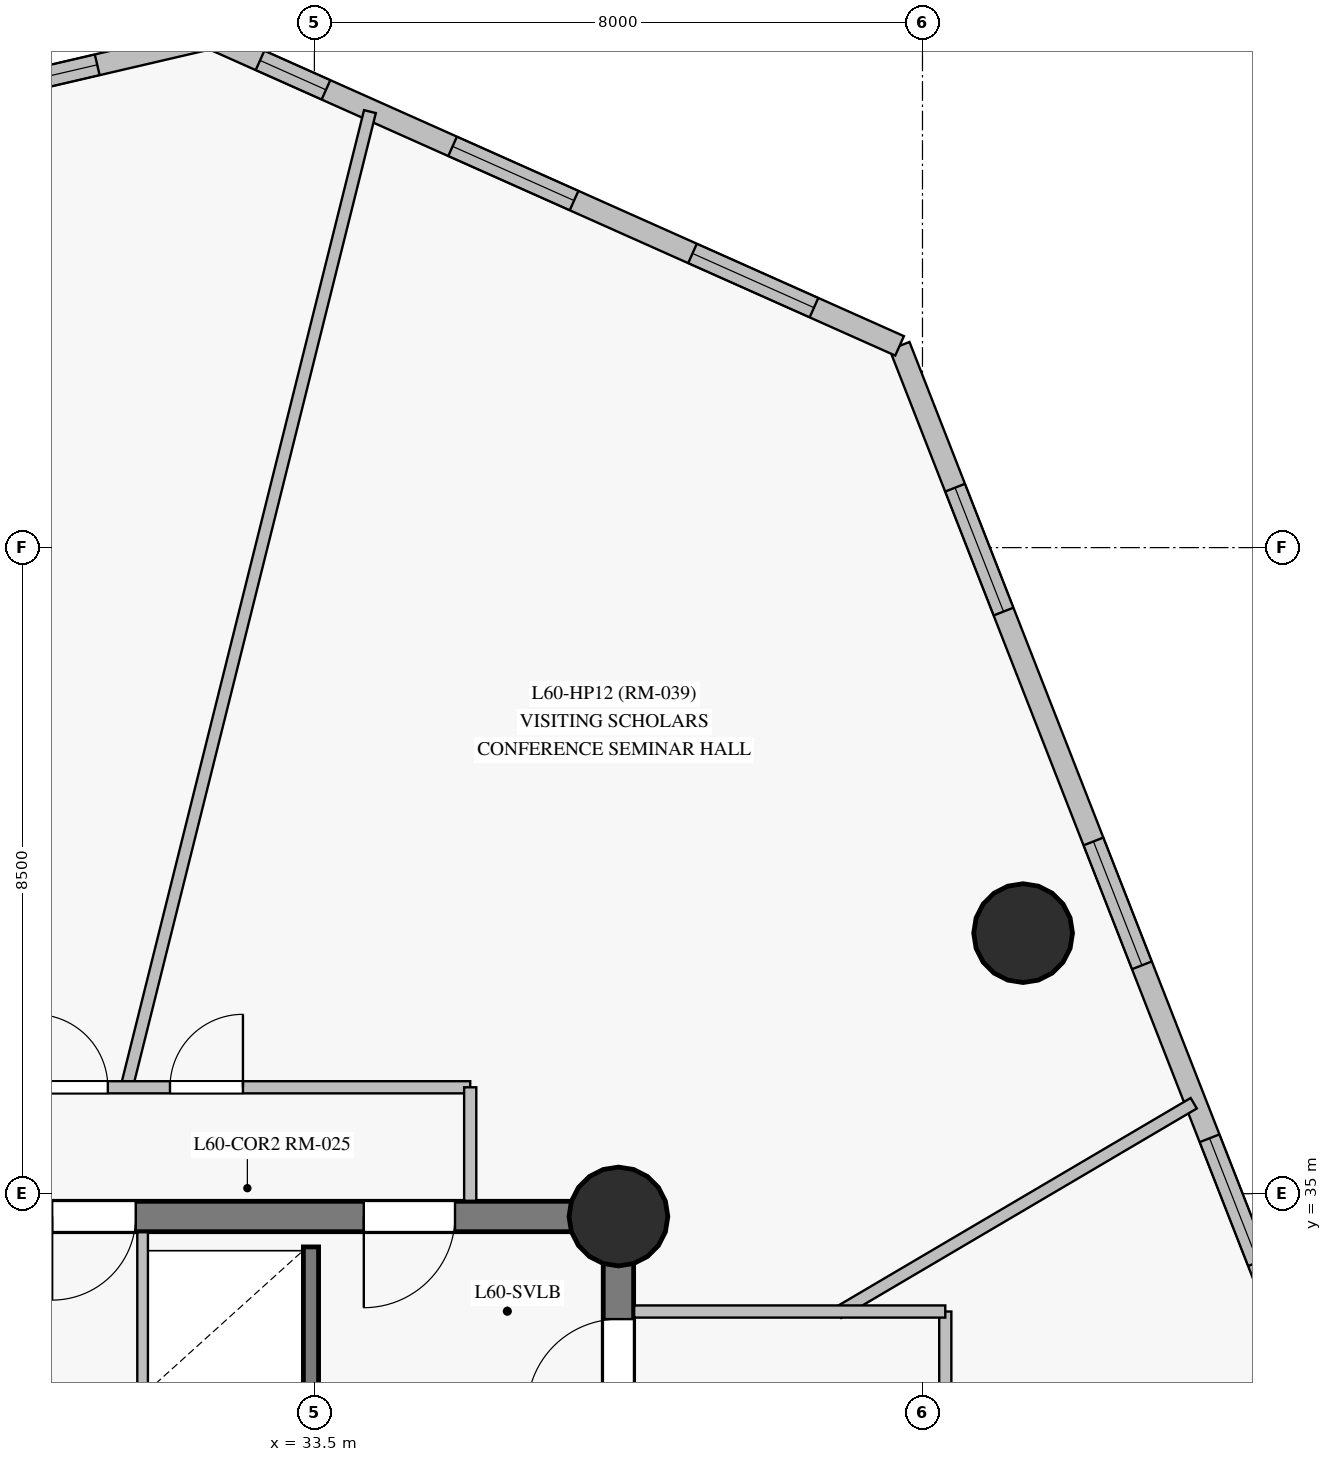
"""IFC4 building model, lengths in metres.
Left out: names, types, materials, properties, quantities, classifications, styles, units other than length and angle.
Written with IfcOpenShell. Run it as: python <this file> out.ifc"""

import sys

from ifc_helpers import new_model, si_unit, direction, frame, frame_2d, origin, origin_with_axes, origin_2d, place, context, subcontext, project, spatial, rectangle, circle, extrude, source, transform, mapped, element, fill, save


model = new_model("IFC4")
c1 = context("Model", 3, precision=1e-05, world=origin(), true_north=direction((0.0, 1.0)))
c2 = subcontext(c1, "Body", "Model", "MODEL_VIEW")
j1 = project(units=[si_unit("LENGTHUNIT", "METRE"), si_unit("PLANEANGLEUNIT", "RADIAN")], contexts=[c1])
p1 = place(None, origin())
s1 = spatial("IfcSite", under=j1, at=p1, CompositionType="ELEMENT")
p2 = place(p1, origin())
s2 = spatial("IfcBuilding", under=s1, at=p2, CompositionType="ELEMENT")
p3 = place(p2, frame((0.0, 0.0, 205.35)))
s3 = spatial("IfcBuildingStorey", under=s2, at=p3, CompositionType="ELEMENT", Elevation=205.35)
p4 = place(p3, frame((37.5, 18.3, 0.0), z_axis=(0.0, 0.0, 1.0), x_axis=(0.0, 1.0, 0.0)))
e1 = element("IfcWall", 1, at=p4, inside=s3, PredefinedType="SHEAR", context=c2, shape_type="SweptSolid", body=[
    extrude(rectangle(XDim=16.4, YDim=0.4, at=frame_2d((8.2, 0.0))), origin(), (0.0, 0.0, 1.0), 2.775),
])
p5 = place(p4, frame((13.85, 0.0, 0.0)))
e2 = element("IfcOpeningElement", 2, at=p5, cuts=e1, PredefinedType="OPENING", context=c2, shape_type="SweptSolid", body=[
    extrude(rectangle(XDim=1.2, YDim=2.15, at=frame_2d((0.6, 1.075))), frame((0.0, 0.21, 0.0), z_axis=(0.0, -1.0, 0.0), x_axis=(1.0, 0.0, 0.0)), (0.0, 0.0, 1.0), 0.42),
])
p6 = place(p3, frame((37.5, 34.7, 0.0), z_axis=(0.0, 0.0, 1.0), x_axis=(-1.0, 0.0, 0.0)))
e3 = element("IfcWall", 3, at=p6, inside=s3, PredefinedType="SHEAR", context=c2, shape_type="SweptSolid", body=[
    extrude(rectangle(XDim=10.95, YDim=0.4, at=frame_2d((5.475, 0.0))), origin(), (0.0, 0.0, 1.0), 2.775),
])
p7 = place(p6, frame((2.15, 0.0, 0.0)))
e4 = element("IfcOpeningElement", 4, at=p7, cuts=e3, PredefinedType="OPENING", context=c2, shape_type="SweptSolid", body=[
    extrude(rectangle(XDim=1.2, YDim=2.15, at=frame_2d((0.6, 1.075))), frame((0.0, 0.21, 0.0), z_axis=(0.0, -1.0, 0.0), x_axis=(1.0, 0.0, 0.0)), (0.0, 0.0, 1.0), 0.42),
])
p8 = place(p6, frame((6.35, 0.0, 0.0)))
e5 = element("IfcOpeningElement", 5, at=p8, cuts=e3, PredefinedType="OPENING", context=c2, shape_type="SweptSolid", body=[
    extrude(rectangle(XDim=1.1, YDim=2.15, at=frame_2d((0.55, 1.075))), frame((0.0, 0.21, 0.0), z_axis=(0.0, -1.0, 0.0), x_axis=(1.0, 0.0, 0.0)), (0.0, 0.0, 1.0), 0.42),
])
m1 = source(origin_with_axes(), c2, "Body", "SweptSolid", [
    extrude(circle(Radius=0.65, at=origin_2d()), origin(), (0.0, 0.0, 1.0), 3.05),
])
for number, where, z_axis, x_axis in (
    (6, (37.5, 34.7, 0.0), (0.0, 0.0, 1.0), (1.0, 0.0, 0.0)),
    (7, (42.824, 38.428, 0.0), (0.0, 0.0, 1.0), (1.0, 0.0, 0.0)),
):
    element("IfcColumn", number, at=place(p3, frame(where, z_axis=z_axis, x_axis=x_axis)), inside=s3, PredefinedType="COLUMN", context=c2, shape_type="MappedRepresentation", body=[
        mapped(m1, transform((0.0, 0.0, 0.0), scale=1.0)),
    ])
p9 = place(p3, frame((46.118, 33.578, 0.0), z_axis=(0.0, 0.0, 1.0), x_axis=(-0.364297776346, 0.931282518976, 0.0)))
e8 = element("IfcWall", 8, at=p9, inside=s3, PredefinedType="SOLIDWALL", context=c2, shape_type="SweptSolid", body=[
    extrude(rectangle(XDim=13.504, YDim=0.28, at=frame_2d((6.752, 0.0))), origin(), (0.0, 0.0, 1.0), 2.775),
])
p10 = place(p9, frame((0.56, 0.0, 0.85)))
e9 = element("IfcOpeningElement", 9, at=p10, cuts=e8, PredefinedType="OPENING", context=c2, shape_type="SweptSolid", body=[
    extrude(rectangle(XDim=1.75, YDim=1.65, at=frame_2d((0.875, 0.825))), frame((0.0, 0.15, 0.0), z_axis=(0.0, -1.0, 0.0), x_axis=(1.0, 0.0, 0.0)), (0.0, 0.0, 1.0), 0.3),
])
p11 = place(p9, frame((4.753, 0.0, 0.85)))
e10 = element("IfcOpeningElement", 10, at=p11, cuts=e8, PredefinedType="OPENING", context=c2, shape_type="SweptSolid", body=[
    extrude(rectangle(XDim=1.75, YDim=1.65, at=frame_2d((0.875, 0.825))), frame((0.0, 0.15, 0.0), z_axis=(0.0, -1.0, 0.0), x_axis=(1.0, 0.0, 0.0)), (0.0, 0.0, 1.0), 0.3),
])
p12 = place(p9, frame((9.75, 0.0, 0.85)))
e11 = element("IfcOpeningElement", 11, at=p12, cuts=e8, PredefinedType="OPENING", context=c2, shape_type="SweptSolid", body=[
    extrude(rectangle(XDim=1.75, YDim=1.65, at=frame_2d((0.875, 0.825))), frame((0.0, 0.15, 0.0), z_axis=(0.0, -1.0, 0.0), x_axis=(1.0, 0.0, 0.0)), (0.0, 0.0, 1.0), 0.3),
])
p13 = place(p3, frame((41.199, 46.154, 0.0), z_axis=(0.0, 0.0, 1.0), x_axis=(-0.913173362766, 0.407571355144, 0.0)))
e12 = element("IfcWall", 12, at=p13, inside=s3, PredefinedType="SOLIDWALL", context=c2, shape_type="SweptSolid", body=[
    extrude(rectangle(XDim=9.925, YDim=0.28, at=frame_2d((4.962, 0.0))), origin(), (0.0, 0.0, 1.0), 2.775),
])
p14 = place(p13, frame((1.233, 0.0, 0.85)))
e13 = element("IfcOpeningElement", 13, at=p14, cuts=e12, PredefinedType="OPENING", context=c2, shape_type="SweptSolid", body=[
    extrude(rectangle(XDim=1.75, YDim=1.65, at=frame_2d((0.875, 0.825))), frame((0.0, 0.15, 0.0), z_axis=(0.0, -1.0, 0.0), x_axis=(1.0, 0.0, 0.0)), (0.0, 0.0, 1.0), 0.3),
])
p15 = place(p13, frame((4.69, 0.0, 0.85)))
e14 = element("IfcOpeningElement", 14, at=p15, cuts=e12, PredefinedType="OPENING", context=c2, shape_type="SweptSolid", body=[
    extrude(rectangle(XDim=1.75, YDim=1.65, at=frame_2d((0.875, 0.825))), frame((0.0, 0.15, 0.0), z_axis=(0.0, -1.0, 0.0), x_axis=(1.0, 0.0, 0.0)), (0.0, 0.0, 1.0), 0.3),
])
p16 = place(p13, frame((8.264, 0.0, 0.85)))
e15 = element("IfcOpeningElement", 15, at=p16, cuts=e12, PredefinedType="OPENING", context=c2, shape_type="SweptSolid", body=[
    extrude(rectangle(XDim=0.95, YDim=1.5, at=frame_2d((0.475, 0.75))), frame((0.0, 0.15, 0.0), z_axis=(0.0, -1.0, 0.0), x_axis=(1.0, 0.0, 0.0)), (0.0, 0.0, 1.0), 0.3),
])
p17 = place(p3, frame((32.136, 50.199, 0.0), z_axis=(0.0, 0.0, 1.0), x_axis=(-0.973978370764, -0.226640978826, 0.0)))
e16 = element("IfcWall", 16, at=p17, inside=s3, PredefinedType="SOLIDWALL", context=c2, shape_type="SweptSolid", body=[
    extrude(rectangle(XDim=12.929, YDim=0.28, at=frame_2d((6.464, 0.0))), origin(), (0.0, 0.0, 1.0), 2.775),
])
p18 = place(p17, frame((1.533, 0.0, 0.85)))
e17 = element("IfcOpeningElement", 17, at=p18, cuts=e16, PredefinedType="OPENING", context=c2, shape_type="SweptSolid", body=[
    extrude(rectangle(XDim=1.75, YDim=1.65, at=frame_2d((0.875, 0.825))), frame((0.0, 0.15, 0.0), z_axis=(0.0, -1.0, 0.0), x_axis=(1.0, 0.0, 0.0)), (0.0, 0.0, 1.0), 0.3),
])
p19 = place(p17, frame((5.59, 0.0, 0.85)))
e18 = element("IfcOpeningElement", 18, at=p19, cuts=e16, PredefinedType="OPENING", context=c2, shape_type="SweptSolid", body=[
    extrude(rectangle(XDim=1.75, YDim=1.65, at=frame_2d((0.875, 0.825))), frame((0.0, 0.15, 0.0), z_axis=(0.0, -1.0, 0.0), x_axis=(1.0, 0.0, 0.0)), (0.0, 0.0, 1.0), 0.3),
])
p20 = place(p17, frame((9.646, 0.0, 0.85)))
e19 = element("IfcOpeningElement", 19, at=p20, cuts=e16, PredefinedType="OPENING", context=c2, shape_type="SweptSolid", body=[
    extrude(rectangle(XDim=1.75, YDim=1.65, at=frame_2d((0.875, 0.825))), frame((0.0, 0.15, 0.0), z_axis=(0.0, -1.0, 0.0), x_axis=(1.0, 0.0, 0.0)), (0.0, 0.0, 1.0), 0.3),
])
p21 = place(p3, frame((33.455, 18.7, 0.0), z_axis=(0.0, 0.0, 1.0), x_axis=(0.0, 1.0, 0.0)))
e20 = element("IfcWall", 20, at=p21, inside=s3, PredefinedType="SHEAR", context=c2, shape_type="SweptSolid", body=[
    extrude(rectangle(XDim=15.6, YDim=0.2, at=frame_2d((7.8, 0.0))), origin(), (0.0, 0.0, 1.0), 2.775),
])
p22 = place(p21, frame((2.75, 0.0, 0.0)))
e21 = element("IfcOpeningElement", 21, at=p22, cuts=e20, PredefinedType="OPENING", context=c2, shape_type="SweptSolid", body=[
    extrude(rectangle(XDim=1.15, YDim=2.15, at=frame_2d((0.575, 1.075))), frame((0.0, 0.11, 0.0), z_axis=(0.0, -1.0, 0.0), x_axis=(1.0, 0.0, 0.0)), (0.0, 0.0, 1.0), 0.22),
])
p23 = place(p21, frame((0.55, 0.0, 0.0)))
e22 = element("IfcOpeningElement", 22, at=p23, cuts=e20, PredefinedType="OPENING", context=c2, shape_type="SweptSolid", body=[
    extrude(rectangle(XDim=0.94, YDim=2.1, at=frame_2d((0.47, 1.05))), frame((0.0, 0.11, 0.0), z_axis=(0.0, -1.0, 0.0), x_axis=(1.0, 0.0, 0.0)), (0.0, 0.0, 1.0), 0.22),
])
p24 = place(p3, frame((41.8, 33.45, 0.0), z_axis=(0.0, 0.0, 1.0), x_axis=(0.0, -1.0, 0.0)))
e23 = element("IfcWall", 23, at=p24, inside=s3, PredefinedType="PARTITIONING", context=c2, shape_type="SweptSolid", body=[
    extrude(rectangle(XDim=19.6, YDim=0.16, at=frame_2d((9.8, 0.0))), origin(), (0.0, 0.0, 1.0), 2.225),
])
p25 = place(p24, frame((9.325, 0.0, 0.0)))
e24 = element("IfcOpeningElement", 24, at=p25, cuts=e23, PredefinedType="OPENING", context=c2, shape_type="SweptSolid", body=[
    extrude(rectangle(XDim=0.96, YDim=2.15, at=frame_2d((0.48, 1.075))), frame((0.0, 0.09, 0.0), z_axis=(0.0, -1.0, 0.0), x_axis=(1.0, 0.0, 0.0)), (0.0, 0.0, 1.0), 0.18),
])
p26 = place(p24, frame((4.425, 0.0, 0.0)))
e25 = element("IfcOpeningElement", 25, at=p26, cuts=e23, PredefinedType="OPENING", context=c2, shape_type="SweptSolid", body=[
    extrude(rectangle(XDim=0.96, YDim=2.15, at=frame_2d((0.48, 1.075))), frame((0.0, 0.09, 0.0), z_axis=(0.0, -1.0, 0.0), x_axis=(1.0, 0.0, 0.0)), (0.0, 0.0, 1.0), 0.18),
])
p27 = place(p3, frame((31.023, 36.371, 0.0), z_axis=(0.0, 0.0, 1.0), x_axis=(0.241933352584, 0.970292869657, 0.0)))
e26 = element("IfcWall", 26, at=p27, inside=s3, PredefinedType="PARTITIONING", context=c2, shape_type="SweptSolid", body=[
    extrude(rectangle(XDim=13.259, YDim=0.16, at=frame_2d((6.629, 0.0))), origin(), (0.0, 0.0, 1.0), 2.775),
])
p28 = place(p3, frame((28.6, 36.4, 0.0), z_axis=(0.0, 0.0, 1.0), x_axis=(1.0, 0.0, 0.0)))
e27 = element("IfcWall", 27, at=p28, inside=s3, PredefinedType="PARTITIONING", context=c2, shape_type="SweptSolid", body=[
    extrude(rectangle(XDim=6.95, YDim=0.16, at=frame_2d((3.475, 0.0))), origin(), (0.0, 0.0, 1.0), 2.325),
])
p29 = place(p28, frame((3.0, 0.0, 0.0)))
e28 = element("IfcOpeningElement", 28, at=p29, cuts=e27, PredefinedType="OPENING", context=c2, shape_type="SweptSolid", body=[
    extrude(rectangle(XDim=0.96, YDim=2.15, at=frame_2d((0.48, 1.075))), frame((0.0, 0.09, 0.0), z_axis=(0.0, -1.0, 0.0), x_axis=(1.0, 0.0, 0.0)), (0.0, 0.0, 1.0), 0.18),
])
p30 = place(p28, frame((1.222, 0.0, 0.0)))
e29 = element("IfcOpeningElement", 29, at=p30, cuts=e27, PredefinedType="OPENING", context=c2, shape_type="SweptSolid", body=[
    extrude(rectangle(XDim=0.96, YDim=2.15, at=frame_2d((0.48, 1.075))), frame((0.0, 0.09, 0.0), z_axis=(0.0, -1.0, 0.0), x_axis=(1.0, 0.0, 0.0)), (0.0, 0.0, 1.0), 0.18),
])
p31 = place(p3, frame((40.391, 33.435, 0.0), z_axis=(0.0, 0.0, 1.0), x_axis=(0.861631176483, 0.507534940386, 0.0)))
e30 = element("IfcWall", 30, at=p31, inside=s3, PredefinedType="PARTITIONING", context=c2, shape_type="SweptSolid", body=[
    extrude(rectangle(XDim=5.429, YDim=0.16, at=frame_2d((2.714, 0.0))), origin(), (0.0, 0.0, 1.0), 2.775),
])
p32 = place(p3, frame((37.707, 33.45, 0.0), z_axis=(0.0, 0.0, 1.0), x_axis=(1.0, 0.0, 0.0)))
e31 = element("IfcWall", 31, at=p32, inside=s3, PredefinedType="PARTITIONING", context=c2, shape_type="SweptSolid", body=[
    extrude(rectangle(XDim=4.093, YDim=0.16, at=frame_2d((2.046, 0.0))), origin(), (0.0, 0.0, 1.0), 2.775),
])
p33 = place(p3, frame((31.24, 30.45, 0.0), z_axis=(0.0, 0.0, 1.0), x_axis=(0.0, 1.0, 0.0)))
e32 = element("IfcWall", 32, at=p33, inside=s3, PredefinedType="PARTITIONING", context=c2, shape_type="SweptSolid", body=[
    extrude(rectangle(XDim=4.043, YDim=0.14, at=frame_2d((2.021, 0.0))), origin(), (0.0, 0.0, 1.0), 2.775),
])
p34 = place(p3, frame((35.55, 36.4, 0.0), z_axis=(0.0, 0.0, 1.0), x_axis=(0.0, -1.0, 0.0)))
e33 = element("IfcWall", 33, at=p34, inside=s3, PredefinedType="PARTITIONING", context=c2, shape_type="SweptSolid", body=[
    extrude(rectangle(XDim=1.493, YDim=0.16, at=frame_2d((0.747, 0.0))), origin(), (0.0, 0.0, 1.0), 2.775),
])
m2 = source(origin_with_axes(), c2, "Body", "SweptSolid", [
    extrude(rectangle(XDim=1.75, YDim=1.65, at=frame_2d((0.875, 0.825))), frame((0.0, 0.03, 0.0), z_axis=(0.0, -1.0, 0.0), x_axis=(1.0, 0.0, 0.0)), (0.0, 0.0, 1.0), 0.06),
])
p35 = place(p10, origin())
e34 = element("IfcWindow", 34, at=p35, inside=s3, PartitioningType="SINGLE_PANEL", PredefinedType="WINDOW", context=c2, shape_type="MappedRepresentation", body=[
    mapped(m2, transform((0.0, 0.0, 0.0), scale=1.0)),
])
fill(e9, e34)
p36 = place(p11, origin())
e35 = element("IfcWindow", 35, at=p36, inside=s3, PartitioningType="SINGLE_PANEL", PredefinedType="WINDOW", context=c2, shape_type="MappedRepresentation", body=[
    mapped(m2, transform((0.0, 0.0, 0.0), scale=1.0)),
])
fill(e10, e35)
p37 = place(p12, origin())
e36 = element("IfcWindow", 36, at=p37, inside=s3, PartitioningType="SINGLE_PANEL", PredefinedType="WINDOW", context=c2, shape_type="MappedRepresentation", body=[
    mapped(m2, transform((0.0, 0.0, 0.0), scale=1.0)),
])
fill(e11, e36)
p38 = place(p14, origin())
e37 = element("IfcWindow", 37, at=p38, inside=s3, PartitioningType="SINGLE_PANEL", PredefinedType="WINDOW", context=c2, shape_type="MappedRepresentation", body=[
    mapped(m2, transform((0.0, 0.0, 0.0), scale=1.0)),
])
fill(e13, e37)
p39 = place(p15, origin())
e38 = element("IfcWindow", 38, at=p39, inside=s3, PartitioningType="SINGLE_PANEL", PredefinedType="WINDOW", context=c2, shape_type="MappedRepresentation", body=[
    mapped(m2, transform((0.0, 0.0, 0.0), scale=1.0)),
])
fill(e14, e38)
m3 = source(origin_with_axes(), c2, "Body", "SweptSolid", [
    extrude(rectangle(XDim=0.95, YDim=1.5, at=frame_2d((0.475, 0.75))), frame((0.0, 0.03, 0.0), z_axis=(0.0, -1.0, 0.0), x_axis=(1.0, 0.0, 0.0)), (0.0, 0.0, 1.0), 0.06),
])
p40 = place(p16, origin())
e39 = element("IfcWindow", 39, at=p40, inside=s3, PartitioningType="SINGLE_PANEL", PredefinedType="WINDOW", context=c2, shape_type="MappedRepresentation", body=[
    mapped(m3, transform((0.0, 0.0, 0.0), scale=1.0)),
])
fill(e15, e39)
p41 = place(p18, origin())
e40 = element("IfcWindow", 40, at=p41, inside=s3, PartitioningType="SINGLE_PANEL", PredefinedType="WINDOW", context=c2, shape_type="MappedRepresentation", body=[
    mapped(m2, transform((0.0, 0.0, 0.0), scale=1.0)),
])
fill(e17, e40)
m4 = source(origin_with_axes(), c2, "Body", "SweptSolid", [
    extrude(rectangle(XDim=1.2, YDim=2.15, at=frame_2d((0.6, 1.075))), frame((0.0, 0.025, 0.0), z_axis=(0.0, -1.0, 0.0), x_axis=(1.0, 0.0, 0.0)), (0.0, 0.0, 1.0), 0.05),
])
p42 = place(p5, origin())
e41 = element("IfcDoor", 41, at=p42, inside=s3, OperationType="SINGLE_SWING_LEFT", PredefinedType="DOOR", context=c2, shape_type="MappedRepresentation", body=[
    mapped(m4, transform((0.0, 0.0, 0.0), scale=1.0)),
])
fill(e2, e41)
p43 = place(p7, origin())
e42 = element("IfcDoor", 42, at=p43, inside=s3, OperationType="SINGLE_SWING_RIGHT", PredefinedType="DOOR", context=c2, shape_type="MappedRepresentation", body=[
    mapped(m4, transform((0.0, 0.0, 0.0), scale=1.0)),
])
fill(e4, e42)
m5 = source(origin_with_axes(), c2, "Body", "SweptSolid", [
    extrude(rectangle(XDim=1.1, YDim=2.15, at=frame_2d((0.55, 1.075))), frame((0.0, 0.025, 0.0), z_axis=(0.0, -1.0, 0.0), x_axis=(1.0, 0.0, 0.0)), (0.0, 0.0, 1.0), 0.05),
])
p44 = place(p8, origin())
e43 = element("IfcDoor", 43, at=p44, inside=s3, OperationType="SINGLE_SWING_RIGHT", PredefinedType="DOOR", context=c2, shape_type="MappedRepresentation", body=[
    mapped(m5, transform((0.0, 0.0, 0.0), scale=1.0)),
])
fill(e5, e43)
m6 = source(origin_with_axes(), c2, "Body", "SweptSolid", [
    extrude(rectangle(XDim=0.96, YDim=2.15, at=frame_2d((0.48, 1.075))), frame((0.0, 0.025, 0.0), z_axis=(0.0, -1.0, 0.0), x_axis=(1.0, 0.0, 0.0)), (0.0, 0.0, 1.0), 0.05),
])
p45 = place(p29, origin())
e44 = element("IfcDoor", 44, at=p45, inside=s3, OperationType="SINGLE_SWING_RIGHT", PredefinedType="DOOR", context=c2, shape_type="MappedRepresentation", body=[
    mapped(m6, transform((0.0, 0.0, 0.0), scale=1.0)),
])
fill(e28, e44)
p46 = place(p30, origin())
e45 = element("IfcDoor", 45, at=p46, inside=s3, OperationType="SINGLE_SWING_LEFT", PredefinedType="DOOR", context=c2, shape_type="MappedRepresentation", body=[
    mapped(m6, transform((0.0, 0.0, 0.0), scale=1.0)),
])
fill(e29, e45)
save(model, sys.argv[1])
